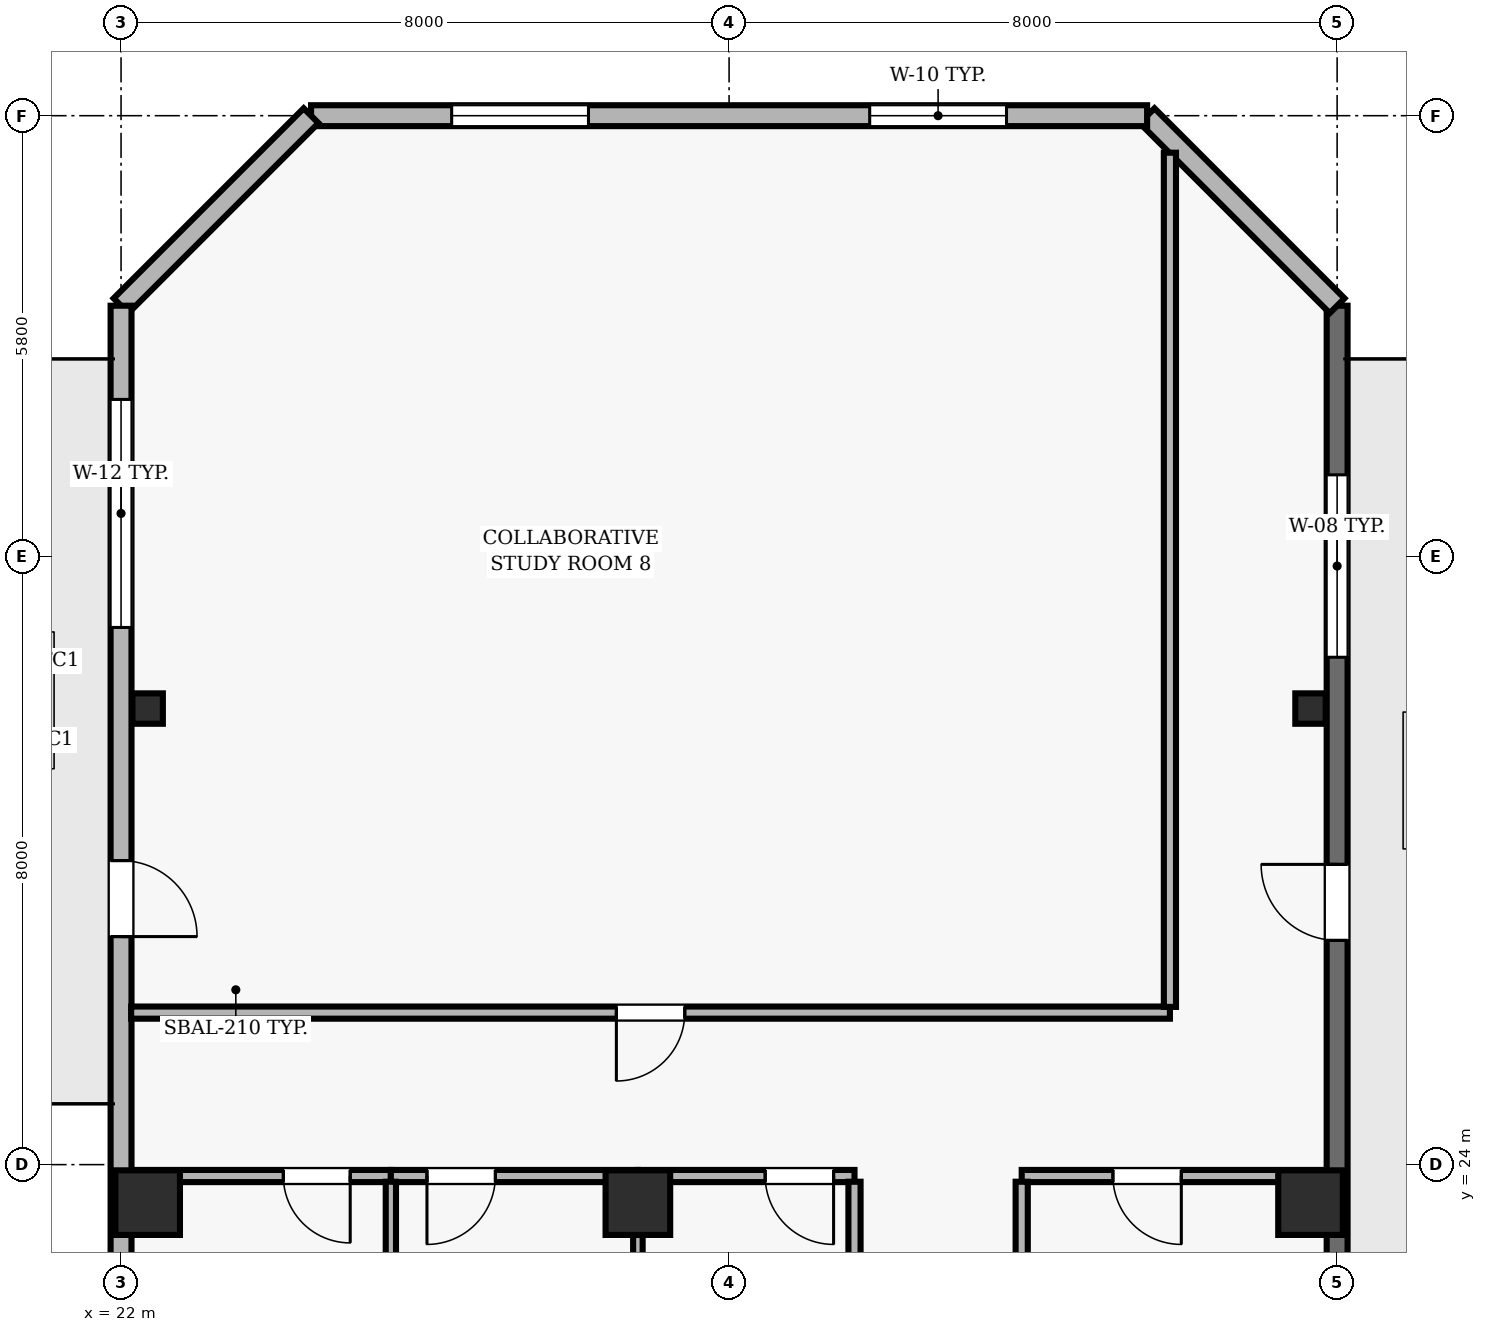
"""IFC4 building model, lengths in metres.
Left out: names, types, materials, properties, quantities, classifications, styles, units other than length and angle.
Written with IfcOpenShell. Run it as: python <this file> out.ifc"""

import sys

from ifc_helpers import new_model, si_unit, direction, frame, frame_2d, origin, origin_2d, place, context, subcontext, project, spatial, rectangle, hollow_rectangle, extrude, element, fill, save


model = new_model("IFC4")
c1 = context("Model", 3, precision=1e-05, world=origin(), true_north=direction((0.0, 1.0)))
c2 = subcontext(c1, "Body", "Model", "MODEL_VIEW")
j1 = project(units=[si_unit("LENGTHUNIT", "METRE"), si_unit("PLANEANGLEUNIT", "RADIAN")], contexts=[c1])
p1 = place(None, origin())
s1 = spatial("IfcSite", under=j1, at=p1, CompositionType="ELEMENT")
p2 = place(p1, origin())
s2 = spatial("IfcBuilding", under=s1, at=p2, CompositionType="ELEMENT")
p3 = place(p2, frame((0.0, 0.0, 291.1)))
s3 = spatial("IfcBuildingStorey", under=s2, at=p3, CompositionType="ELEMENT", Elevation=291.1)
for number, where, z_axis, x_axis in (
    (1, (22.35, 23.5, 0.0), (0.0, 0.0, 1.0), (1.0, 0.0, 0.0)),
    (2, (28.8, 23.5, 0.0), (0.0, 0.0, 1.0), (1.0, 0.0, 0.0)),
    (3, (37.65, 23.5, 0.0), (0.0, 0.0, 1.0), (1.0, 0.0, 0.0)),
):
    element("IfcColumn", number, at=place(p3, frame(where, z_axis=z_axis, x_axis=x_axis)), inside=s3, PredefinedType="COLUMN", context=c2, shape_type="SweptSolid", body=[
        extrude(rectangle(XDim=0.85, YDim=0.85, at=origin_2d()), origin(), (0.0, 0.0, 1.0), 3.9),
    ])
for number, where, z_axis, x_axis in (
    (4, (22.35, 30.0, 0.0), (0.0, 0.0, 1.0), (1.0, 0.0, 0.0)),
    (5, (37.65, 30.0, 0.0), (0.0, 0.0, 1.0), (1.0, 0.0, 0.0)),
):
    element("IfcColumn", number, at=place(p3, frame(where, z_axis=z_axis, x_axis=x_axis)), inside=s3, PredefinedType="COLUMN", context=c2, shape_type="SweptSolid", body=[
        extrude(hollow_rectangle(XDim=0.4, YDim=0.4, WallThickness=0.02, at=origin_2d()), origin(), (0.0, 0.0, 1.0), 3.9),
    ])
p4 = place(p3, frame((38.0, 21.6, 0.0), z_axis=(0.0, 0.0, 1.0), x_axis=(0.0, 1.0, 0.0)))
e6 = element("IfcWall", 6, at=p4, inside=s3, PredefinedType="SOLIDWALL", context=c2, shape_type="SweptSolid", body=[
    extrude(rectangle(XDim=13.7, YDim=0.275, at=frame_2d((6.85, 0.0))), origin(), (0.0, 0.0, 1.0), 3.69),
])
p5 = place(p4, frame((5.35, 0.0, 0.0)))
e7 = element("IfcOpeningElement", 7, at=p5, cuts=e6, PredefinedType="OPENING", context=c2, shape_type="SweptSolid", body=[
    extrude(rectangle(XDim=1.0, YDim=2.2, at=frame_2d((0.5, 1.1))), frame((0.0, 0.147, 0.0), z_axis=(0.0, -1.0, 0.0), x_axis=(1.0, 0.0, 0.0)), (0.0, 0.0, 1.0), 0.295),
])
p6 = place(p4, frame((9.075, 0.0, 0.9)))
e8 = element("IfcOpeningElement", 8, at=p6, cuts=e6, PredefinedType="OPENING", context=c2, shape_type="SweptSolid", body=[
    extrude(rectangle(XDim=2.4, YDim=1.8, at=frame_2d((1.2, 0.9))), frame((0.0, 0.147, 0.0), z_axis=(0.0, -1.0, 0.0), x_axis=(1.0, 0.0, 0.0)), (0.0, 0.0, 1.0), 0.295),
])
p7 = place(p3, frame((38.0, 35.3, 0.0), z_axis=(0.0, 0.0, 1.0), x_axis=(-0.707106781187, 0.707106781187, 0.0)))
e9 = element("IfcWall", 9, at=p7, inside=s3, PredefinedType="SOLIDWALL", context=c2, shape_type="SweptSolid", body=[
    extrude(rectangle(XDim=3.536, YDim=0.275, at=frame_2d((1.768, 0.0))), origin(), (0.0, 0.0, 1.0), 3.69),
])
p8 = place(p3, frame((35.5, 37.8, 0.0), z_axis=(0.0, 0.0, 1.0), x_axis=(-1.0, 0.0, 0.0)))
e10 = element("IfcWall", 10, at=p8, inside=s3, PredefinedType="SOLIDWALL", context=c2, shape_type="SweptSolid", body=[
    extrude(rectangle(XDim=11.0, YDim=0.275, at=frame_2d((5.5, 0.0))), origin(), (0.0, 0.0, 1.0), 3.69),
])
p9 = place(p8, frame((1.85, 0.0, 0.9)))
e11 = element("IfcOpeningElement", 11, at=p9, cuts=e10, PredefinedType="OPENING", context=c2, shape_type="SweptSolid", body=[
    extrude(rectangle(XDim=1.8, YDim=2.2, at=frame_2d((0.9, 1.1))), frame((0.0, 0.147, 0.0), z_axis=(0.0, -1.0, 0.0), x_axis=(1.0, 0.0, 0.0)), (0.0, 0.0, 1.0), 0.295),
])
p10 = place(p8, frame((7.35, 0.0, 0.9)))
e12 = element("IfcOpeningElement", 12, at=p10, cuts=e10, PredefinedType="OPENING", context=c2, shape_type="SweptSolid", body=[
    extrude(rectangle(XDim=1.8, YDim=2.2, at=frame_2d((0.9, 1.1))), frame((0.0, 0.147, 0.0), z_axis=(0.0, -1.0, 0.0), x_axis=(1.0, 0.0, 0.0)), (0.0, 0.0, 1.0), 0.295),
])
p11 = place(p3, frame((24.5, 37.8, 0.0), z_axis=(0.0, 0.0, 1.0), x_axis=(-0.707106781187, -0.707106781187, 0.0)))
e13 = element("IfcWall", 13, at=p11, inside=s3, PredefinedType="SOLIDWALL", context=c2, shape_type="SweptSolid", body=[
    extrude(rectangle(XDim=3.536, YDim=0.275, at=frame_2d((1.768, 0.0))), origin(), (0.0, 0.0, 1.0), 3.69),
])
p12 = place(p3, frame((22.0, 35.3, 0.0), z_axis=(0.0, 0.0, 1.0), x_axis=(0.0, -1.0, 0.0)))
e14 = element("IfcWall", 14, at=p12, inside=s3, PredefinedType="SOLIDWALL", context=c2, shape_type="SweptSolid", body=[
    extrude(rectangle(XDim=32.8, YDim=0.275, at=frame_2d((16.4, 0.0))), origin(), (0.0, 0.0, 1.0), 3.69),
])
p13 = place(p12, frame((7.3, 0.0, 0.0)))
e15 = element("IfcOpeningElement", 15, at=p13, cuts=e14, PredefinedType="OPENING", context=c2, shape_type="SweptSolid", body=[
    extrude(rectangle(XDim=1.0, YDim=2.2, at=frame_2d((0.5, 1.1))), frame((0.0, 0.147, 0.0), z_axis=(0.0, -1.0, 0.0), x_axis=(1.0, 0.0, 0.0)), (0.0, 0.0, 1.0), 0.295),
])
p14 = place(p12, frame((1.233, 0.0, 0.9)))
e16 = element("IfcOpeningElement", 16, at=p14, cuts=e14, PredefinedType="OPENING", context=c2, shape_type="SweptSolid", body=[
    extrude(rectangle(XDim=3.0, YDim=2.2, at=frame_2d((1.5, 1.1))), frame((0.0, 0.147, 0.0), z_axis=(0.0, -1.0, 0.0), x_axis=(1.0, 0.0, 0.0)), (0.0, 0.0, 1.0), 0.295),
])
p15 = place(p12, frame((12.617, 0.0, 0.9)))
e17 = element("IfcOpeningElement", 17, at=p15, cuts=e14, PredefinedType="OPENING", context=c2, shape_type="SweptSolid", body=[
    extrude(rectangle(XDim=3.0, YDim=2.2, at=frame_2d((1.5, 1.1))), frame((0.0, 0.147, 0.0), z_axis=(0.0, -1.0, 0.0), x_axis=(1.0, 0.0, 0.0)), (0.0, 0.0, 1.0), 0.295),
])
p16 = place(p12, frame((23.1, 0.0, 0.9)))
e18 = element("IfcOpeningElement", 18, at=p16, cuts=e14, PredefinedType="OPENING", context=c2, shape_type="SweptSolid", body=[
    extrude(rectangle(XDim=3.0, YDim=2.2, at=frame_2d((1.5, 1.1))), frame((0.0, 0.147, 0.0), z_axis=(0.0, -1.0, 0.0), x_axis=(1.0, 0.0, 0.0)), (0.0, 0.0, 1.0), 0.295),
])
p17 = place(p3, frame((25.55, 23.85, 0.0), z_axis=(0.0, 0.0, 1.0), x_axis=(-1.0, 0.0, 0.0)))
e19 = element("IfcWall", 19, at=p17, inside=s3, PredefinedType="PARTITIONING", context=c2, shape_type="SweptSolid", body=[
    extrude(rectangle(XDim=3.35, YDim=0.16, at=frame_2d((1.675, 0.0))), origin(), (0.0, 0.0, 1.0), 3.227),
])
p18 = place(p17, frame((0.535, 0.0, 0.0)))
e20 = element("IfcOpeningElement", 20, at=p18, cuts=e19, PredefinedType="OPENING", context=c2, shape_type="SweptSolid", body=[
    extrude(rectangle(XDim=0.88, YDim=2.1, at=frame_2d((0.44, 1.05))), frame((0.0, 0.09, 0.0), z_axis=(0.0, -1.0, 0.0), x_axis=(1.0, 0.0, 0.0)), (0.0, 0.0, 1.0), 0.18),
])
p19 = place(p3, frame((28.8, 23.85, 0.0), z_axis=(0.0, 0.0, 1.0), x_axis=(-1.0, 0.0, 0.0)))
e21 = element("IfcWall", 21, at=p19, inside=s3, PredefinedType="PARTITIONING", context=c2, shape_type="SweptSolid", body=[
    extrude(rectangle(XDim=3.25, YDim=0.16, at=frame_2d((1.625, 0.0))), origin(), (0.0, 0.0, 1.0), 3.227),
])
p20 = place(p19, frame((1.875, 0.0, 0.0)))
e22 = element("IfcOpeningElement", 22, at=p20, cuts=e21, PredefinedType="OPENING", context=c2, shape_type="SweptSolid", body=[
    extrude(rectangle(XDim=0.9, YDim=2.1, at=frame_2d((0.45, 1.05))), frame((0.0, 0.09, 0.0), z_axis=(0.0, -1.0, 0.0), x_axis=(1.0, 0.0, 0.0)), (0.0, 0.0, 1.0), 0.18),
])
p21 = place(p3, frame((31.65, 23.85, 0.0), z_axis=(0.0, 0.0, 1.0), x_axis=(-1.0, 0.0, 0.0)))
e23 = element("IfcWall", 23, at=p21, inside=s3, PredefinedType="PARTITIONING", context=c2, shape_type="SweptSolid", body=[
    extrude(rectangle(XDim=2.85, YDim=0.16, at=frame_2d((1.425, 0.0))), origin(), (0.0, 0.0, 1.0), 3.227),
])
p22 = place(p21, frame((0.275, 0.0, 0.0)))
e24 = element("IfcOpeningElement", 24, at=p22, cuts=e23, PredefinedType="OPENING", context=c2, shape_type="SweptSolid", body=[
    extrude(rectangle(XDim=0.9, YDim=2.1, at=frame_2d((0.45, 1.05))), frame((0.0, 0.09, 0.0), z_axis=(0.0, -1.0, 0.0), x_axis=(1.0, 0.0, 0.0)), (0.0, 0.0, 1.0), 0.18),
])
p23 = place(p3, frame((35.8, 26.0, 0.0), z_axis=(0.0, 0.0, 1.0), x_axis=(-1.0, 0.0, 0.0)))
e25 = element("IfcWall", 25, at=p23, inside=s3, PredefinedType="PARTITIONING", context=c2, shape_type="SweptSolid", body=[
    extrude(rectangle(XDim=13.667, YDim=0.16, at=frame_2d((6.833, 0.0))), origin(), (0.0, 0.0, 1.0), 3.69),
])
p24 = place(p23, frame((6.383, 0.0, 0.0)))
e26 = element("IfcOpeningElement", 26, at=p24, cuts=e25, PredefinedType="OPENING", context=c2, shape_type="SweptSolid", body=[
    extrude(rectangle(XDim=0.9, YDim=2.1, at=frame_2d((0.45, 1.05))), frame((0.0, 0.09, 0.0), z_axis=(0.0, -1.0, 0.0), x_axis=(1.0, 0.0, 0.0)), (0.0, 0.0, 1.0), 0.18),
])
p25 = place(p3, frame((37.85, 23.85, 0.0), z_axis=(0.0, 0.0, 1.0), x_axis=(-1.0, 0.0, 0.0)))
e27 = element("IfcWall", 27, at=p25, inside=s3, PredefinedType="PARTITIONING", context=c2, shape_type="SweptSolid", body=[
    extrude(rectangle(XDim=4.0, YDim=0.16, at=frame_2d((2.0, 0.0))), origin(), (0.0, 0.0, 1.0), 3.227),
])
p26 = place(p25, frame((1.9, 0.0, 0.0)))
e28 = element("IfcOpeningElement", 28, at=p26, cuts=e27, PredefinedType="OPENING", context=c2, shape_type="SweptSolid", body=[
    extrude(rectangle(XDim=0.9, YDim=2.1, at=frame_2d((0.45, 1.05))), frame((0.0, 0.09, 0.0), z_axis=(0.0, -1.0, 0.0), x_axis=(1.0, 0.0, 0.0)), (0.0, 0.0, 1.0), 0.18),
])
p27 = place(p3, frame((25.55, 19.16, 0.0), z_axis=(0.0, 0.0, 1.0), x_axis=(0.0, 1.0, 0.0)))
e29 = element("IfcWall", 29, at=p27, inside=s3, PredefinedType="PARTITIONING", context=c2, shape_type="SweptSolid", body=[
    extrude(rectangle(XDim=4.615, YDim=0.135, at=frame_2d((2.308, 0.0))), origin(), (0.0, 0.0, 1.0), 3.69),
])
p28 = place(p3, frame((28.8, 23.775, 0.0), z_axis=(0.0, 0.0, 1.0), x_axis=(0.0, -1.0, 0.0)))
e30 = element("IfcWall", 30, at=p28, inside=s3, PredefinedType="PARTITIONING", context=c2, shape_type="SweptSolid", body=[
    extrude(rectangle(XDim=2.267, YDim=0.125, at=frame_2d((1.133, 0.0))), origin(), (0.0, 0.0, 1.0), 3.69),
])
p29 = place(p3, frame((31.65, 23.775, 0.0), z_axis=(0.0, 0.0, 1.0), x_axis=(0.0, -1.0, 0.0)))
e31 = element("IfcWall", 31, at=p29, inside=s3, PredefinedType="PARTITIONING", context=c2, shape_type="SweptSolid", body=[
    extrude(rectangle(XDim=2.267, YDim=0.16, at=frame_2d((1.133, 0.0))), origin(), (0.0, 0.0, 1.0), 3.69),
])
p30 = place(p3, frame((33.85, 20.835, 0.0), z_axis=(0.0, 0.0, 1.0), x_axis=(0.0, 1.0, 0.0)))
e32 = element("IfcWall", 32, at=p30, inside=s3, PredefinedType="PARTITIONING", context=c2, shape_type="SweptSolid", body=[
    extrude(rectangle(XDim=2.94, YDim=0.16, at=frame_2d((1.47, 0.0))), origin(), (0.0, 0.0, 1.0), 3.69),
])
p31 = place(p3, frame((35.8, 37.313, 0.0), z_axis=(0.0, 0.0, 1.0), x_axis=(0.0, -1.0, 0.0)))
e33 = element("IfcWall", 33, at=p31, inside=s3, PredefinedType="PARTITIONING", context=c2, shape_type="SweptSolid", body=[
    extrude(rectangle(XDim=11.238, YDim=0.16, at=frame_2d((5.619, 0.0))), origin(), (0.0, 0.0, 1.0), 3.69),
])
p32 = place(p5, origin())
e34 = element("IfcDoor", 34, at=p32, inside=s3, OperationType="SINGLE_SWING_RIGHT", PredefinedType="DOOR", context=c2, shape_type="SweptSolid", body=[
    extrude(rectangle(XDim=1.0, YDim=2.2, at=frame_2d((0.5, 1.1))), frame((0.0, 0.025, 0.0), z_axis=(0.0, -1.0, 0.0), x_axis=(1.0, 0.0, 0.0)), (0.0, 0.0, 1.0), 0.05),
])
fill(e7, e34)
p33 = place(p6, origin())
e35 = element("IfcWindow", 35, at=p33, inside=s3, PartitioningType="SINGLE_PANEL", PredefinedType="WINDOW", context=c2, shape_type="SweptSolid", body=[
    extrude(rectangle(XDim=2.4, YDim=1.8, at=frame_2d((1.2, 0.9))), frame((0.0, 0.03, 0.0), z_axis=(0.0, -1.0, 0.0), x_axis=(1.0, 0.0, 0.0)), (0.0, 0.0, 1.0), 0.06),
])
fill(e8, e35)
p34 = place(p9, origin())
e36 = element("IfcWindow", 36, at=p34, inside=s3, PartitioningType="SINGLE_PANEL", PredefinedType="WINDOW", context=c2, shape_type="SweptSolid", body=[
    extrude(rectangle(XDim=1.8, YDim=2.2, at=frame_2d((0.9, 1.1))), frame((0.0, 0.03, 0.0), z_axis=(0.0, -1.0, 0.0), x_axis=(1.0, 0.0, 0.0)), (0.0, 0.0, 1.0), 0.06),
])
fill(e11, e36)
p35 = place(p10, origin())
e37 = element("IfcWindow", 37, at=p35, inside=s3, PartitioningType="SINGLE_PANEL", PredefinedType="WINDOW", context=c2, shape_type="SweptSolid", body=[
    extrude(rectangle(XDim=1.8, YDim=2.2, at=frame_2d((0.9, 1.1))), frame((0.0, 0.03, 0.0), z_axis=(0.0, -1.0, 0.0), x_axis=(1.0, 0.0, 0.0)), (0.0, 0.0, 1.0), 0.06),
])
fill(e12, e37)
p36 = place(p13, origin())
e38 = element("IfcDoor", 38, at=p36, inside=s3, OperationType="SINGLE_SWING_RIGHT", PredefinedType="DOOR", context=c2, shape_type="SweptSolid", body=[
    extrude(rectangle(XDim=1.0, YDim=2.2, at=frame_2d((0.5, 1.1))), frame((0.0, 0.025, 0.0), z_axis=(0.0, -1.0, 0.0), x_axis=(1.0, 0.0, 0.0)), (0.0, 0.0, 1.0), 0.05),
])
fill(e15, e38)
p37 = place(p14, origin())
e39 = element("IfcWindow", 39, at=p37, inside=s3, PartitioningType="SINGLE_PANEL", PredefinedType="WINDOW", context=c2, shape_type="SweptSolid", body=[
    extrude(rectangle(XDim=3.0, YDim=2.2, at=frame_2d((1.5, 1.1))), frame((0.0, 0.03, 0.0), z_axis=(0.0, -1.0, 0.0), x_axis=(1.0, 0.0, 0.0)), (0.0, 0.0, 1.0), 0.06),
])
fill(e16, e39)
p38 = place(p26, origin())
e40 = element("IfcDoor", 40, at=p38, inside=s3, OperationType="SINGLE_SWING_LEFT", PredefinedType="DOOR", context=c2, shape_type="SweptSolid", body=[
    extrude(rectangle(XDim=0.9, YDim=2.1, at=frame_2d((0.45, 1.05))), frame((0.0, 0.025, 0.0), z_axis=(0.0, -1.0, 0.0), x_axis=(1.0, 0.0, 0.0)), (0.0, 0.0, 1.0), 0.05),
])
fill(e28, e40)
p39 = place(p22, origin())
e41 = element("IfcDoor", 41, at=p39, inside=s3, OperationType="SINGLE_SWING_LEFT", PredefinedType="DOOR", context=c2, shape_type="SweptSolid", body=[
    extrude(rectangle(XDim=0.9, YDim=2.1, at=frame_2d((0.45, 1.05))), frame((0.0, 0.025, 0.0), z_axis=(0.0, -1.0, 0.0), x_axis=(1.0, 0.0, 0.0)), (0.0, 0.0, 1.0), 0.05),
])
fill(e24, e41)
p40 = place(p18, origin())
e42 = element("IfcDoor", 42, at=p40, inside=s3, OperationType="SINGLE_SWING_LEFT", PredefinedType="DOOR", context=c2, shape_type="SweptSolid", body=[
    extrude(rectangle(XDim=0.88, YDim=2.1, at=frame_2d((0.44, 1.05))), frame((0.0, 0.025, 0.0), z_axis=(0.0, -1.0, 0.0), x_axis=(1.0, 0.0, 0.0)), (0.0, 0.0, 1.0), 0.05),
])
fill(e20, e42)
p41 = place(p20, origin())
e43 = element("IfcDoor", 43, at=p41, inside=s3, OperationType="SINGLE_SWING_RIGHT", PredefinedType="DOOR", context=c2, shape_type="SweptSolid", body=[
    extrude(rectangle(XDim=0.9, YDim=2.1, at=frame_2d((0.45, 1.05))), frame((0.0, 0.025, 0.0), z_axis=(0.0, -1.0, 0.0), x_axis=(1.0, 0.0, 0.0)), (0.0, 0.0, 1.0), 0.05),
])
fill(e22, e43)
p42 = place(p24, origin())
e44 = element("IfcDoor", 44, at=p42, inside=s3, OperationType="SINGLE_SWING_RIGHT", PredefinedType="DOOR", context=c2, shape_type="SweptSolid", body=[
    extrude(rectangle(XDim=0.9, YDim=2.1, at=frame_2d((0.45, 1.05))), frame((0.0, 0.025, 0.0), z_axis=(0.0, -1.0, 0.0), x_axis=(1.0, 0.0, 0.0)), (0.0, 0.0, 1.0), 0.05),
])
fill(e26, e44)
save(model, sys.argv[1])
